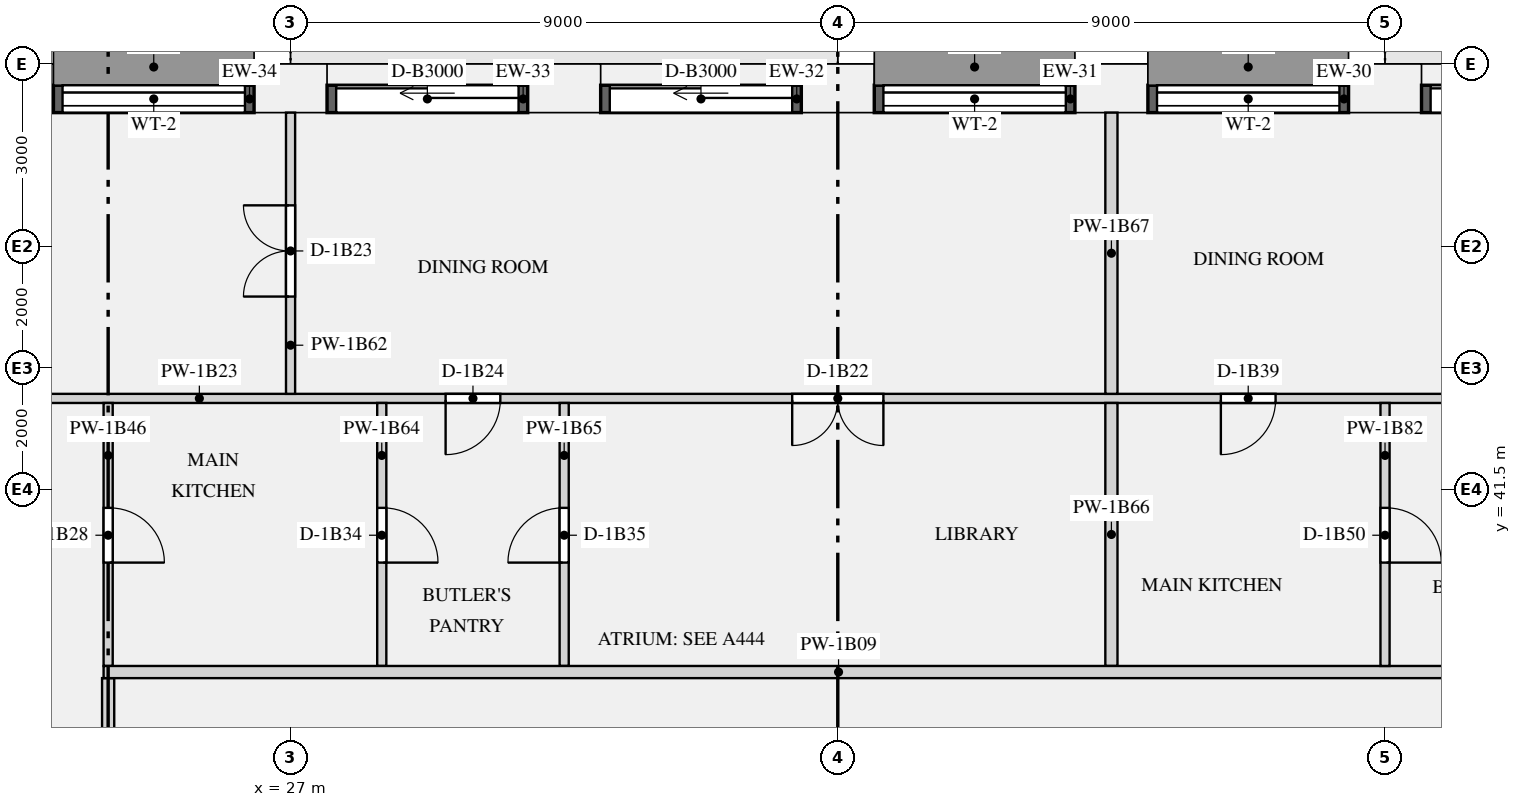
"""IFC4 building model, lengths in metres.
Left out: names, types, materials, properties, quantities, classifications, styles, units other than length and angle.
Written with IfcOpenShell. Run it as: python <this file> out.ifc"""

import sys

from ifc_helpers import new_model, si_unit, direction, frame, frame_2d, origin, origin_2d, place, context, subcontext, project, spatial, rectangle, extrude, element, fill, save


model = new_model("IFC4")
c1 = context("Model", 3, precision=1e-05, world=origin(), true_north=direction((0.0, 1.0)))
c2 = subcontext(c1, "Body", "Model", "MODEL_VIEW")
j1 = project(units=[si_unit("LENGTHUNIT", "METRE"), si_unit("PLANEANGLEUNIT", "RADIAN")], contexts=[c1])
p1 = place(None, origin())
s1 = spatial("IfcSite", under=j1, at=p1, CompositionType="ELEMENT")
p2 = place(p1, origin())
s2 = spatial("IfcBuilding", under=s1, at=p2, CompositionType="ELEMENT")
p3 = place(p2, frame((0.0, 0.0, 28.95)))
s3 = spatial("IfcBuildingStorey", under=s2, at=p3, CompositionType="ELEMENT", Elevation=28.95)
for number, where, z_axis, x_axis in (
    (1, (45.0, 48.1, 0.0), (0.0, 0.0, 1.0), (-1.0, 0.0, 0.0)),
    (2, (40.5, 48.1, 0.0), (0.0, 0.0, 1.0), (-1.0, 0.0, 0.0)),
    (3, (36.0, 48.1, 0.0), (0.0, 0.0, 1.0), (-1.0, 0.0, 0.0)),
    (4, (31.5, 48.1, 0.0), (0.0, 0.0, 1.0), (-1.0, 0.0, 0.0)),
    (5, (27.0, 48.1, 0.0), (0.0, 0.0, 1.0), (-1.0, 0.0, 0.0)),
    (6, (22.5, 48.1, 0.0), (0.0, 0.0, 1.0), (-1.0, 0.0, 0.0)),
):
    element("IfcColumn", number, at=place(p3, frame(where, z_axis=z_axis, x_axis=x_axis)), inside=s3, PredefinedType="USERDEFINED", context=c2, shape_type="SweptSolid", body=[
        extrude(rectangle(XDim=1.2, YDim=0.8, at=origin_2d()), origin(), (0.0, 0.0, 1.0), 3.15),
    ])
p4 = place(p3, frame((48.9, 47.925, 0.0), z_axis=(0.0, 0.0, 1.0), x_axis=(-1.0, 0.0, 0.0)))
e7 = element("IfcWall", 7, at=p4, inside=s3, PredefinedType="SOLIDWALL", context=c2, shape_type="SweptSolid", body=[
    extrude(rectangle(XDim=3.3, YDim=0.45, at=frame_2d((1.65, 0.0))), origin(), (0.0, 0.0, 1.0), 2.83),
])
p5 = place(p4, frame((0.15, 0.0, 0.0)))
e8 = element("IfcOpeningElement", 8, at=p5, cuts=e7, PredefinedType="OPENING", context=c2, shape_type="SweptSolid", body=[
    extrude(rectangle(XDim=3.0, YDim=2.3, at=frame_2d((1.5, 1.15))), frame((0.0, 0.235, 0.0), z_axis=(0.0, -1.0, 0.0), x_axis=(1.0, 0.0, 0.0)), (0.0, 0.0, 1.0), 0.47),
])
p6 = place(p3, frame((44.4, 47.925, 0.9), z_axis=(0.0, 0.0, 1.0), x_axis=(-1.0, 0.0, 0.0)))
e9 = element("IfcWall", 9, at=p6, inside=s3, PredefinedType="SOLIDWALL", context=c2, shape_type="SweptSolid", body=[
    extrude(rectangle(XDim=3.3, YDim=0.45, at=frame_2d((1.65, 0.0))), origin(), (0.0, 0.0, 1.0), 1.93),
])
p7 = place(p6, frame((0.15, 0.0, 0.15)))
e10 = element("IfcOpeningElement", 10, at=p7, cuts=e9, PredefinedType="OPENING", context=c2, shape_type="SweptSolid", body=[
    extrude(rectangle(XDim=3.0, YDim=1.5, at=frame_2d((1.5, 0.75))), frame((0.0, 0.235, 0.0), z_axis=(0.0, -1.0, 0.0), x_axis=(1.0, 0.0, 0.0)), (0.0, 0.0, 1.0), 0.47),
])
p8 = place(p3, frame((39.9, 47.925, 0.9), z_axis=(0.0, 0.0, 1.0), x_axis=(-1.0, 0.0, 0.0)))
e11 = element("IfcWall", 11, at=p8, inside=s3, PredefinedType="SOLIDWALL", context=c2, shape_type="SweptSolid", body=[
    extrude(rectangle(XDim=3.3, YDim=0.45, at=frame_2d((1.65, 0.0))), origin(), (0.0, 0.0, 1.0), 1.93),
])
p9 = place(p8, frame((0.15, 0.0, 0.15)))
e12 = element("IfcOpeningElement", 12, at=p9, cuts=e11, PredefinedType="OPENING", context=c2, shape_type="SweptSolid", body=[
    extrude(rectangle(XDim=3.0, YDim=1.5, at=frame_2d((1.5, 0.75))), frame((0.0, 0.235, 0.0), z_axis=(0.0, -1.0, 0.0), x_axis=(1.0, 0.0, 0.0)), (0.0, 0.0, 1.0), 0.47),
])
p10 = place(p3, frame((35.4, 47.925, 0.0), z_axis=(0.0, 0.0, 1.0), x_axis=(-1.0, 0.0, 0.0)))
e13 = element("IfcWall", 13, at=p10, inside=s3, PredefinedType="SOLIDWALL", context=c2, shape_type="SweptSolid", body=[
    extrude(rectangle(XDim=3.3, YDim=0.45, at=frame_2d((1.65, 0.0))), origin(), (0.0, 0.0, 1.0), 2.83),
])
p11 = place(p10, frame((0.15, 0.0, 0.0)))
e14 = element("IfcOpeningElement", 14, at=p11, cuts=e13, PredefinedType="OPENING", context=c2, shape_type="SweptSolid", body=[
    extrude(rectangle(XDim=3.0, YDim=2.3, at=frame_2d((1.5, 1.15))), frame((0.0, 0.235, 0.0), z_axis=(0.0, -1.0, 0.0), x_axis=(1.0, 0.0, 0.0)), (0.0, 0.0, 1.0), 0.47),
])
p12 = place(p3, frame((30.9, 47.925, 0.0), z_axis=(0.0, 0.0, 1.0), x_axis=(-1.0, 0.0, 0.0)))
e15 = element("IfcWall", 15, at=p12, inside=s3, PredefinedType="SOLIDWALL", context=c2, shape_type="SweptSolid", body=[
    extrude(rectangle(XDim=3.3, YDim=0.45, at=frame_2d((1.65, 0.0))), origin(), (0.0, 0.0, 1.0), 2.83),
])
p13 = place(p12, frame((0.15, 0.0, 0.0)))
e16 = element("IfcOpeningElement", 16, at=p13, cuts=e15, PredefinedType="OPENING", context=c2, shape_type="SweptSolid", body=[
    extrude(rectangle(XDim=3.0, YDim=2.3, at=frame_2d((1.5, 1.15))), frame((0.0, 0.235, 0.0), z_axis=(0.0, -1.0, 0.0), x_axis=(1.0, 0.0, 0.0)), (0.0, 0.0, 1.0), 0.47),
])
p14 = place(p3, frame((26.4, 47.925, 0.9), z_axis=(0.0, 0.0, 1.0), x_axis=(-1.0, 0.0, 0.0)))
e17 = element("IfcWall", 17, at=p14, inside=s3, PredefinedType="SOLIDWALL", context=c2, shape_type="SweptSolid", body=[
    extrude(rectangle(XDim=3.3, YDim=0.45, at=frame_2d((1.65, 0.0))), origin(), (0.0, 0.0, 1.0), 1.93),
])
p15 = place(p14, frame((0.15, 0.0, 0.15)))
e18 = element("IfcOpeningElement", 18, at=p15, cuts=e17, PredefinedType="OPENING", context=c2, shape_type="SweptSolid", body=[
    extrude(rectangle(XDim=3.0, YDim=1.5, at=frame_2d((1.5, 0.75))), frame((0.0, 0.235, 0.0), z_axis=(0.0, -1.0, 0.0), x_axis=(1.0, 0.0, 0.0)), (0.0, 0.0, 1.0), 0.47),
])
p16 = place(p3, frame((23.925, 38.5, 0.0), z_axis=(0.0, 0.0, 1.0), x_axis=(1.0, 0.0, 0.0)))
e19 = element("IfcWall", 19, at=p16, inside=s3, PredefinedType="PARTITIONING", context=c2, shape_type="SweptSolid", body=[
    extrude(rectangle(XDim=24.175, YDim=0.2, at=frame_2d((12.087, 0.0))), origin(), (0.0, 0.0, 1.0), 2.83),
])
p17 = place(p3, frame((18.075, 43.0, 0.0), z_axis=(0.0, 0.0, 1.0), x_axis=(1.0, 0.0, 0.0)))
e20 = element("IfcWall", 20, at=p17, inside=s3, PredefinedType="PARTITIONING", context=c2, shape_type="SweptSolid", body=[
    extrude(rectangle(XDim=31.35, YDim=0.15, at=frame_2d((15.675, 0.0))), origin(), (0.0, 0.0, 1.0), 2.83),
])
p18 = place(p17, frame((17.175, 0.0, 0.0)))
e21 = element("IfcOpeningElement", 21, at=p18, cuts=e20, PredefinedType="OPENING", context=c2, shape_type="SweptSolid", body=[
    extrude(rectangle(XDim=1.5, YDim=2.1, at=frame_2d((0.75, 1.05))), frame((0.0, 0.085, 0.0), z_axis=(0.0, -1.0, 0.0), x_axis=(1.0, 0.0, 0.0)), (0.0, 0.0, 1.0), 0.17),
])
p19 = place(p17, frame((11.475, 0.0, 0.0)))
e22 = element("IfcOpeningElement", 22, at=p19, cuts=e20, PredefinedType="OPENING", context=c2, shape_type="SweptSolid", body=[
    extrude(rectangle(XDim=0.9, YDim=2.1, at=frame_2d((0.45, 1.05))), frame((0.0, 0.085, 0.0), z_axis=(0.0, -1.0, 0.0), x_axis=(1.0, 0.0, 0.0)), (0.0, 0.0, 1.0), 0.17),
])
p20 = place(p17, frame((2.475, 0.0, 0.0)))
e23 = element("IfcOpeningElement", 23, at=p20, cuts=e20, PredefinedType="OPENING", context=c2, shape_type="SweptSolid", body=[
    extrude(rectangle(XDim=0.9, YDim=2.1, at=frame_2d((0.45, 1.05))), frame((0.0, 0.085, 0.0), z_axis=(0.0, -1.0, 0.0), x_axis=(1.0, 0.0, 0.0)), (0.0, 0.0, 1.0), 0.17),
])
p21 = place(p17, frame((24.225, 0.0, 0.0)))
e24 = element("IfcOpeningElement", 24, at=p21, cuts=e20, PredefinedType="OPENING", context=c2, shape_type="SweptSolid", body=[
    extrude(rectangle(XDim=0.9, YDim=2.1, at=frame_2d((0.45, 1.05))), frame((0.0, 0.085, 0.0), z_axis=(0.0, -1.0, 0.0), x_axis=(1.0, 0.0, 0.0)), (0.0, 0.0, 1.0), 0.17),
])
p22 = place(p17, frame((28.725, 0.0, 0.0)))
e25 = element("IfcOpeningElement", 25, at=p22, cuts=e20, PredefinedType="OPENING", context=c2, shape_type="SweptSolid", body=[
    extrude(rectangle(XDim=0.9, YDim=2.1, at=frame_2d((0.45, 1.05))), frame((0.0, 0.085, 0.0), z_axis=(0.0, -1.0, 0.0), x_axis=(1.0, 0.0, 0.0)), (0.0, 0.0, 1.0), 0.17),
])
p23 = place(p3, frame((24.0, 38.6, 0.0), z_axis=(0.0, 0.0, 1.0), x_axis=(0.0, 1.0, 0.0)))
e26 = element("IfcWall", 26, at=p23, inside=s3, PredefinedType="PARTITIONING", context=c2, shape_type="SweptSolid", body=[
    extrude(rectangle(XDim=4.325, YDim=0.15, at=frame_2d((2.163, 0.0))), origin(), (0.0, 0.0, 1.0), 2.83),
])
p24 = place(p23, frame((1.7, 0.0, 0.0)))
e27 = element("IfcOpeningElement", 27, at=p24, cuts=e26, PredefinedType="OPENING", context=c2, shape_type="SweptSolid", body=[
    extrude(rectangle(XDim=0.9, YDim=2.1, at=frame_2d((0.45, 1.05))), frame((0.0, 0.085, 0.0), z_axis=(0.0, -1.0, 0.0), x_axis=(1.0, 0.0, 0.0)), (0.0, 0.0, 1.0), 0.17),
])
p25 = place(p3, frame((24.0, 27.1, 0.0), z_axis=(0.0, 0.0, 1.0), x_axis=(0.0, 1.0, 0.0)))
e28 = element("IfcWall", 28, at=p25, inside=s3, PredefinedType="PARTITIONING", context=c2, shape_type="SweptSolid", body=[
    extrude(rectangle(XDim=11.3, YDim=0.2, at=frame_2d((5.65, 0.0))), origin(), (0.0, 0.0, 1.0), 2.83),
])
p26 = place(p25, frame((5.35, 0.0, 0.0)))
e29 = element("IfcOpeningElement", 29, at=p26, cuts=e28, PredefinedType="OPENING", context=c2, shape_type="SweptSolid", body=[
    extrude(rectangle(XDim=1.1, YDim=2.1, at=frame_2d((0.55, 1.05))), frame((0.0, 0.11, 0.0), z_axis=(0.0, -1.0, 0.0), x_axis=(1.0, 0.0, 0.0)), (0.0, 0.0, 1.0), 0.22),
])
p27 = place(p3, frame((27.0, 43.075, 0.0), z_axis=(0.0, 0.0, 1.0), x_axis=(0.0, 1.0, 0.0)))
e30 = element("IfcWall", 30, at=p27, inside=s3, PredefinedType="PARTITIONING", context=c2, shape_type="SweptSolid", body=[
    extrude(rectangle(XDim=4.625, YDim=0.15, at=frame_2d((2.312, 0.0))), origin(), (0.0, 0.0, 1.0), 2.83),
])
p28 = place(p27, frame((1.6, 0.0, 0.0)))
e31 = element("IfcOpeningElement", 31, at=p28, cuts=e30, PredefinedType="OPENING", context=c2, shape_type="SweptSolid", body=[
    extrude(rectangle(XDim=1.5, YDim=2.1, at=frame_2d((0.75, 1.05))), frame((0.0, 0.085, 0.0), z_axis=(0.0, -1.0, 0.0), x_axis=(1.0, 0.0, 0.0)), (0.0, 0.0, 1.0), 0.17),
])
p29 = place(p3, frame((28.5, 38.6, 0.0), z_axis=(0.0, 0.0, 1.0), x_axis=(0.0, 1.0, 0.0)))
e32 = element("IfcWall", 32, at=p29, inside=s3, PredefinedType="PARTITIONING", context=c2, shape_type="SweptSolid", body=[
    extrude(rectangle(XDim=4.325, YDim=0.15, at=frame_2d((2.163, 0.0))), origin(), (0.0, 0.0, 1.0), 2.83),
])
p30 = place(p29, frame((1.7, 0.0, 0.0)))
e33 = element("IfcOpeningElement", 33, at=p30, cuts=e32, PredefinedType="OPENING", context=c2, shape_type="SweptSolid", body=[
    extrude(rectangle(XDim=0.9, YDim=2.1, at=frame_2d((0.45, 1.05))), frame((0.0, 0.085, 0.0), z_axis=(0.0, -1.0, 0.0), x_axis=(1.0, 0.0, 0.0)), (0.0, 0.0, 1.0), 0.17),
])
p31 = place(p3, frame((31.5, 38.6, 0.0), z_axis=(0.0, 0.0, 1.0), x_axis=(0.0, 1.0, 0.0)))
e34 = element("IfcWall", 34, at=p31, inside=s3, PredefinedType="PARTITIONING", context=c2, shape_type="SweptSolid", body=[
    extrude(rectangle(XDim=4.325, YDim=0.15, at=frame_2d((2.163, 0.0))), origin(), (0.0, 0.0, 1.0), 2.83),
])
p32 = place(p31, frame((1.7, 0.0, 0.0)))
e35 = element("IfcOpeningElement", 35, at=p32, cuts=e34, PredefinedType="OPENING", context=c2, shape_type="SweptSolid", body=[
    extrude(rectangle(XDim=0.9, YDim=2.1, at=frame_2d((0.45, 1.05))), frame((0.0, 0.085, 0.0), z_axis=(0.0, -1.0, 0.0), x_axis=(1.0, 0.0, 0.0)), (0.0, 0.0, 1.0), 0.17),
])
p33 = place(p3, frame((40.5, 38.6, 0.0), z_axis=(0.0, 0.0, 1.0), x_axis=(0.0, 1.0, 0.0)))
e36 = element("IfcWall", 36, at=p33, inside=s3, PredefinedType="PARTITIONING", context=c2, shape_type="SweptSolid", body=[
    extrude(rectangle(XDim=4.325, YDim=0.2, at=frame_2d((2.163, 0.0))), origin(), (0.0, 0.0, 1.0), 2.83),
])
p34 = place(p3, frame((40.5, 43.075, 0.0), z_axis=(0.0, 0.0, 1.0), x_axis=(0.0, 1.0, 0.0)))
e37 = element("IfcWall", 37, at=p34, inside=s3, PredefinedType="PARTITIONING", context=c2, shape_type="SweptSolid", body=[
    extrude(rectangle(XDim=4.625, YDim=0.2, at=frame_2d((2.312, 0.0))), origin(), (0.0, 0.0, 1.0), 2.83),
])
p35 = place(p3, frame((45.0, 38.6, 0.0), z_axis=(0.0, 0.0, 1.0), x_axis=(0.0, 1.0, 0.0)))
e38 = element("IfcWall", 38, at=p35, inside=s3, PredefinedType="PARTITIONING", context=c2, shape_type="SweptSolid", body=[
    extrude(rectangle(XDim=4.325, YDim=0.15, at=frame_2d((2.163, 0.0))), origin(), (0.0, 0.0, 1.0), 2.83),
])
p36 = place(p35, frame((1.7, 0.0, 0.0)))
e39 = element("IfcOpeningElement", 39, at=p36, cuts=e38, PredefinedType="OPENING", context=c2, shape_type="SweptSolid", body=[
    extrude(rectangle(XDim=0.9, YDim=2.1, at=frame_2d((0.45, 1.05))), frame((0.0, 0.085, 0.0), z_axis=(0.0, -1.0, 0.0), x_axis=(1.0, 0.0, 0.0)), (0.0, 0.0, 1.0), 0.17),
])
p37 = place(p5, origin())
e40 = element("IfcDoor", 40, at=p37, inside=s3, OperationType="SLIDING_TO_LEFT", PredefinedType="DOOR", context=c2, shape_type="SweptSolid", body=[
    extrude(rectangle(XDim=3.0, YDim=2.3, at=frame_2d((1.5, 1.15))), frame((0.0, -0.07, 0.0), z_axis=(0.0, -1.0, 0.0), x_axis=(1.0, 0.0, 0.0)), (0.0, 0.0, 1.0), 0.05),
])
fill(e8, e40)
p38 = place(p7, origin())
e41 = element("IfcWindow", 41, at=p38, inside=s3, PartitioningType="SINGLE_PANEL", PredefinedType="WINDOW", context=c2, shape_type="SweptSolid", body=[
    extrude(rectangle(XDim=3.0, YDim=1.5, at=frame_2d((1.5, 0.75))), frame((0.0, -0.065, 0.0), z_axis=(0.0, -1.0, 0.0), x_axis=(1.0, 0.0, 0.0)), (0.0, 0.0, 1.0), 0.06),
])
fill(e10, e41)
p39 = place(p9, origin())
e42 = element("IfcWindow", 42, at=p39, inside=s3, PartitioningType="SINGLE_PANEL", PredefinedType="WINDOW", context=c2, shape_type="SweptSolid", body=[
    extrude(rectangle(XDim=3.0, YDim=1.5, at=frame_2d((1.5, 0.75))), frame((0.0, -0.065, 0.0), z_axis=(0.0, -1.0, 0.0), x_axis=(1.0, 0.0, 0.0)), (0.0, 0.0, 1.0), 0.06),
])
fill(e12, e42)
p40 = place(p11, origin())
e43 = element("IfcDoor", 43, at=p40, inside=s3, OperationType="SLIDING_TO_LEFT", PredefinedType="DOOR", context=c2, shape_type="SweptSolid", body=[
    extrude(rectangle(XDim=3.0, YDim=2.3, at=frame_2d((1.5, 1.15))), frame((0.0, -0.07, 0.0), z_axis=(0.0, -1.0, 0.0), x_axis=(1.0, 0.0, 0.0)), (0.0, 0.0, 1.0), 0.05),
])
fill(e14, e43)
p41 = place(p13, origin())
e44 = element("IfcDoor", 44, at=p41, inside=s3, OperationType="SLIDING_TO_LEFT", PredefinedType="DOOR", context=c2, shape_type="SweptSolid", body=[
    extrude(rectangle(XDim=3.0, YDim=2.3, at=frame_2d((1.5, 1.15))), frame((0.0, -0.07, 0.0), z_axis=(0.0, -1.0, 0.0), x_axis=(1.0, 0.0, 0.0)), (0.0, 0.0, 1.0), 0.05),
])
fill(e16, e44)
p42 = place(p15, origin())
e45 = element("IfcWindow", 45, at=p42, inside=s3, PartitioningType="SINGLE_PANEL", PredefinedType="WINDOW", context=c2, shape_type="SweptSolid", body=[
    extrude(rectangle(XDim=3.0, YDim=1.5, at=frame_2d((1.5, 0.75))), frame((0.0, -0.065, 0.0), z_axis=(0.0, -1.0, 0.0), x_axis=(1.0, 0.0, 0.0)), (0.0, 0.0, 1.0), 0.06),
])
fill(e18, e45)
p43 = place(p18, frame((1.5, 0.0, 0.0), z_axis=(0.0, 0.0, 1.0), x_axis=(-1.0, 0.0, 0.0)))
e46 = element("IfcDoor", 46, at=p43, inside=s3, OperationType="DOUBLE_DOOR_SINGLE_SWING", PredefinedType="DOOR", context=c2, shape_type="SweptSolid", body=[
    extrude(rectangle(XDim=1.5, YDim=2.1, at=frame_2d((0.75, 1.05))), frame((0.0, 0.025, 0.0), z_axis=(0.0, -1.0, 0.0), x_axis=(1.0, 0.0, 0.0)), (0.0, 0.0, 1.0), 0.05),
])
fill(e21, e46)
p44 = place(p28, origin())
e47 = element("IfcDoor", 47, at=p44, inside=s3, OperationType="DOUBLE_DOOR_SINGLE_SWING", PredefinedType="DOOR", context=c2, shape_type="SweptSolid", body=[
    extrude(rectangle(XDim=1.5, YDim=2.1, at=frame_2d((0.75, 1.05))), frame((0.0, 0.025, 0.0), z_axis=(0.0, -1.0, 0.0), x_axis=(1.0, 0.0, 0.0)), (0.0, 0.0, 1.0), 0.05),
])
fill(e31, e47)
p45 = place(p19, frame((0.9, 0.0, 0.0), z_axis=(0.0, 0.0, 1.0), x_axis=(-1.0, 0.0, 0.0)))
e48 = element("IfcDoor", 48, at=p45, inside=s3, OperationType="SINGLE_SWING_RIGHT", PredefinedType="DOOR", context=c2, shape_type="SweptSolid", body=[
    extrude(rectangle(XDim=0.9, YDim=2.1, at=frame_2d((0.45, 1.05))), frame((0.0, 0.025, 0.0), z_axis=(0.0, -1.0, 0.0), x_axis=(1.0, 0.0, 0.0)), (0.0, 0.0, 1.0), 0.05),
])
fill(e22, e48)
p46 = place(p24, frame((0.9, 0.0, 0.0), z_axis=(0.0, 0.0, 1.0), x_axis=(-1.0, 0.0, 0.0)))
e49 = element("IfcDoor", 49, at=p46, inside=s3, OperationType="SINGLE_SWING_RIGHT", PredefinedType="DOOR", context=c2, shape_type="SweptSolid", body=[
    extrude(rectangle(XDim=0.9, YDim=2.1, at=frame_2d((0.45, 1.05))), frame((0.0, 0.025, 0.0), z_axis=(0.0, -1.0, 0.0), x_axis=(1.0, 0.0, 0.0)), (0.0, 0.0, 1.0), 0.05),
])
fill(e27, e49)
p47 = place(p30, frame((0.9, 0.0, 0.0), z_axis=(0.0, 0.0, 1.0), x_axis=(-1.0, 0.0, 0.0)))
e50 = element("IfcDoor", 50, at=p47, inside=s3, OperationType="SINGLE_SWING_RIGHT", PredefinedType="DOOR", context=c2, shape_type="SweptSolid", body=[
    extrude(rectangle(XDim=0.9, YDim=2.1, at=frame_2d((0.45, 1.05))), frame((0.0, 0.025, 0.0), z_axis=(0.0, -1.0, 0.0), x_axis=(1.0, 0.0, 0.0)), (0.0, 0.0, 1.0), 0.05),
])
fill(e33, e50)
p48 = place(p32, origin())
e51 = element("IfcDoor", 51, at=p48, inside=s3, OperationType="SINGLE_SWING_LEFT", PredefinedType="DOOR", context=c2, shape_type="SweptSolid", body=[
    extrude(rectangle(XDim=0.9, YDim=2.1, at=frame_2d((0.45, 1.05))), frame((0.0, 0.025, 0.0), z_axis=(0.0, -1.0, 0.0), x_axis=(1.0, 0.0, 0.0)), (0.0, 0.0, 1.0), 0.05),
])
fill(e35, e51)
p49 = place(p21, frame((0.9, 0.0, 0.0), z_axis=(0.0, 0.0, 1.0), x_axis=(-1.0, 0.0, 0.0)))
e52 = element("IfcDoor", 52, at=p49, inside=s3, OperationType="SINGLE_SWING_RIGHT", PredefinedType="DOOR", context=c2, shape_type="SweptSolid", body=[
    extrude(rectangle(XDim=0.9, YDim=2.1, at=frame_2d((0.45, 1.05))), frame((0.0, 0.025, 0.0), z_axis=(0.0, -1.0, 0.0), x_axis=(1.0, 0.0, 0.0)), (0.0, 0.0, 1.0), 0.05),
])
fill(e24, e52)
p50 = place(p36, frame((0.9, 0.0, 0.0), z_axis=(0.0, 0.0, 1.0), x_axis=(-1.0, 0.0, 0.0)))
e53 = element("IfcDoor", 53, at=p50, inside=s3, OperationType="SINGLE_SWING_RIGHT", PredefinedType="DOOR", context=c2, shape_type="SweptSolid", body=[
    extrude(rectangle(XDim=0.9, YDim=2.1, at=frame_2d((0.45, 1.05))), frame((0.0, 0.025, 0.0), z_axis=(0.0, -1.0, 0.0), x_axis=(1.0, 0.0, 0.0)), (0.0, 0.0, 1.0), 0.05),
])
fill(e39, e53)
save(model, sys.argv[1])
